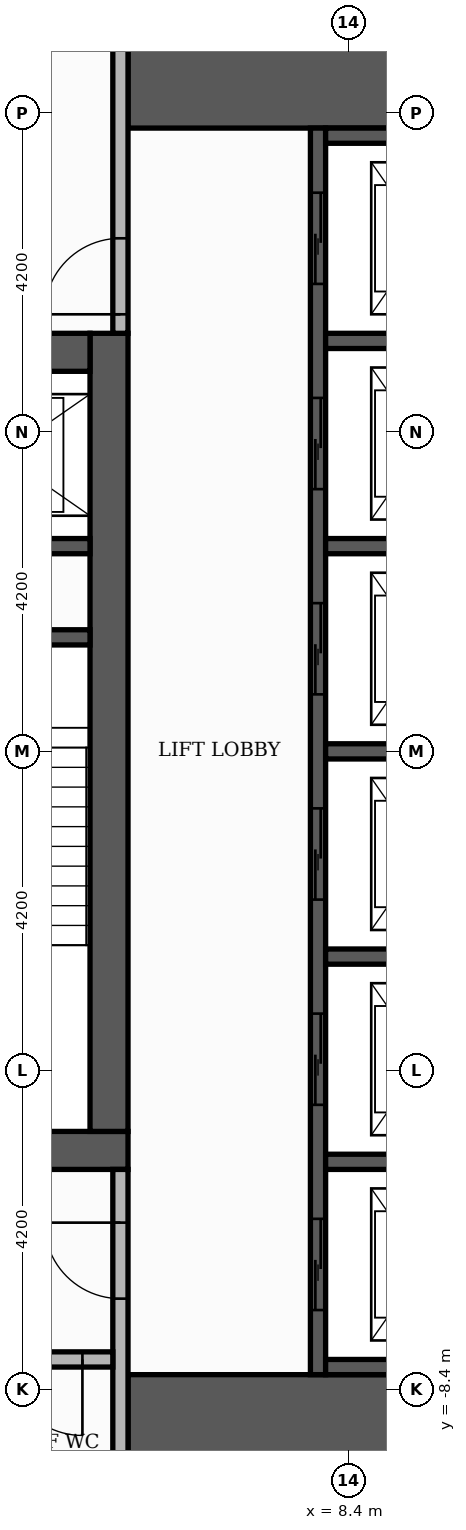
"""IFC4 building model, lengths in metres.
Left out: names, types, materials, properties, quantities, classifications, styles, units other than length and angle.
Written with IfcOpenShell. Run it as: python <this file> out.ifc"""

import sys

from ifc_helpers import new_model, si_unit, direction, frame, frame_2d, origin, place, context, subcontext, project, spatial, rectangle, extrude, element, fill, save


model = new_model("IFC4")
c1 = context("Model", 3, precision=1e-05, world=origin(), true_north=direction((0.0, 1.0)))
c2 = subcontext(c1, "Body", "Model", "MODEL_VIEW")
j1 = project(units=[si_unit("LENGTHUNIT", "METRE"), si_unit("PLANEANGLEUNIT", "RADIAN")], contexts=[c1])
p1 = place(None, origin())
s1 = spatial("IfcSite", under=j1, at=p1, CompositionType="ELEMENT")
p2 = place(p1, origin())
s2 = spatial("IfcBuilding", under=s1, at=p2, CompositionType="ELEMENT")
p3 = place(p2, frame((0.0, 0.0, 223.5)))
s3 = spatial("IfcBuildingStorey", under=s2, at=p3, CompositionType="ELEMENT", Elevation=223.5)
p4 = place(p3, frame((-5.5, -5.25, 0.0), z_axis=(0.0, 0.0, 1.0), x_axis=(1.0, 0.0, 0.0)))
e1 = element("IfcWall", 1, at=p4, inside=s3, PredefinedType="SHEAR", context=c2, shape_type="SweptSolid", body=[
    extrude(rectangle(XDim=11.0, YDim=0.5, at=frame_2d((5.5, 0.0))), origin(), (0.0, 0.0, 1.0), 3.48),
])
p5 = place(p4, frame((4.9, 0.0, 0.0)))
e2 = element("IfcOpeningElement", 2, at=p5, cuts=e1, PredefinedType="OPENING", context=c2, shape_type="SweptSolid", body=[
    extrude(rectangle(XDim=1.2, YDim=2.1, at=frame_2d((0.6, 1.05))), frame((0.0, 0.26, 0.0), z_axis=(0.0, -1.0, 0.0), x_axis=(1.0, 0.0, 0.0)), (0.0, 0.0, 1.0), 0.52),
])
p6 = place(p3, frame((5.25, -5.0, 0.0), z_axis=(0.0, 0.0, 1.0), x_axis=(0.0, 1.0, 0.0)))
e3 = element("IfcWall", 3, at=p6, inside=s3, PredefinedType="SHEAR", context=c2, shape_type="SweptSolid", body=[
    extrude(rectangle(XDim=10.5, YDim=0.5, at=frame_2d((5.25, 0.0))), origin(), (0.0, 0.0, 1.0), 3.48),
])
p7 = place(p3, frame((-5.0, 5.25, 0.0), z_axis=(0.0, 0.0, 1.0), x_axis=(1.0, 0.0, 0.0)))
e4 = element("IfcWall", 4, at=p7, inside=s3, PredefinedType="SHEAR", context=c2, shape_type="SweptSolid", body=[
    extrude(rectangle(XDim=10.0, YDim=0.5, at=frame_2d((5.0, 0.0))), origin(), (0.0, 0.0, 1.0), 3.48),
])
p8 = place(p7, frame((4.4, 0.0, 0.0)))
e5 = element("IfcOpeningElement", 5, at=p8, cuts=e4, PredefinedType="OPENING", context=c2, shape_type="SweptSolid", body=[
    extrude(rectangle(XDim=1.2, YDim=2.1, at=frame_2d((0.6, 1.05))), frame((0.0, 0.26, 0.0), z_axis=(0.0, -1.0, 0.0), x_axis=(1.0, 0.0, 0.0)), (0.0, 0.0, 1.0), 0.52),
])
for number, where, z_axis, x_axis in (
    (6, (5.5, -9.15, 0.0), (0.0, 0.0, 1.0), (1.0, 0.0, 0.0)),
    (7, (5.5, 9.15, 0.0), (0.0, 0.0, 1.0), (1.0, 0.0, 0.0)),
):
    element("IfcWall", number, at=place(p3, frame(where, z_axis=z_axis, x_axis=x_axis)), inside=s3, PredefinedType="SHEAR", context=c2, shape_type="SweptSolid", body=[
        extrude(rectangle(XDim=4.6, YDim=1.9, at=frame_2d((2.3, 0.0))), origin(), (0.0, 0.0, 1.0), 3.48),
    ])
p9 = place(p3, frame((2.15, 1.5, 0.0), z_axis=(0.0, 0.0, 1.0), x_axis=(1.0, 0.0, 0.0)))
e8 = element("IfcWall", 8, at=p9, inside=s3, PredefinedType="SHEAR", context=c2, shape_type="SweptSolid", body=[
    extrude(rectangle(XDim=2.85, YDim=0.2, at=frame_2d((1.425, 0.0))), origin(), (0.0, 0.0, 1.0), 3.48),
])
p10 = place(p3, frame((8.0, -8.2, 0.0), z_axis=(0.0, 0.0, 1.0), x_axis=(0.0, 1.0, 0.0)))
e9 = element("IfcWall", 9, at=p10, inside=s3, PredefinedType="SHEAR", context=c2, shape_type="SweptSolid", body=[
    extrude(rectangle(XDim=16.4, YDim=0.2, at=frame_2d((8.2, 0.0))), origin(), (0.0, 0.0, 1.0), 3.48),
])
p11 = place(p10, frame((0.85, 0.0, 0.0)))
e10 = element("IfcOpeningElement", 10, at=p11, cuts=e9, PredefinedType="OPENING", context=c2, shape_type="SweptSolid", body=[
    extrude(rectangle(XDim=1.2, YDim=2.1, at=frame_2d((0.6, 1.05))), frame((0.0, 0.11, 0.0), z_axis=(0.0, -1.0, 0.0), x_axis=(1.0, 0.0, 0.0)), (0.0, 0.0, 1.0), 0.22),
])
p12 = place(p10, frame((3.55, 0.0, 0.0)))
e11 = element("IfcOpeningElement", 11, at=p12, cuts=e9, PredefinedType="OPENING", context=c2, shape_type="SweptSolid", body=[
    extrude(rectangle(XDim=1.2, YDim=2.1, at=frame_2d((0.6, 1.05))), frame((0.0, 0.11, 0.0), z_axis=(0.0, -1.0, 0.0), x_axis=(1.0, 0.0, 0.0)), (0.0, 0.0, 1.0), 0.22),
])
p13 = place(p10, frame((6.25, 0.0, 0.0)))
e12 = element("IfcOpeningElement", 12, at=p13, cuts=e9, PredefinedType="OPENING", context=c2, shape_type="SweptSolid", body=[
    extrude(rectangle(XDim=1.2, YDim=2.1, at=frame_2d((0.6, 1.05))), frame((0.0, 0.11, 0.0), z_axis=(0.0, -1.0, 0.0), x_axis=(1.0, 0.0, 0.0)), (0.0, 0.0, 1.0), 0.22),
])
p14 = place(p10, frame((8.95, 0.0, 0.0)))
e13 = element("IfcOpeningElement", 13, at=p14, cuts=e9, PredefinedType="OPENING", context=c2, shape_type="SweptSolid", body=[
    extrude(rectangle(XDim=1.2, YDim=2.1, at=frame_2d((0.6, 1.05))), frame((0.0, 0.11, 0.0), z_axis=(0.0, -1.0, 0.0), x_axis=(1.0, 0.0, 0.0)), (0.0, 0.0, 1.0), 0.22),
])
p15 = place(p10, frame((11.65, 0.0, 0.0)))
e14 = element("IfcOpeningElement", 14, at=p15, cuts=e9, PredefinedType="OPENING", context=c2, shape_type="SweptSolid", body=[
    extrude(rectangle(XDim=1.2, YDim=2.1, at=frame_2d((0.6, 1.05))), frame((0.0, 0.11, 0.0), z_axis=(0.0, -1.0, 0.0), x_axis=(1.0, 0.0, 0.0)), (0.0, 0.0, 1.0), 0.22),
])
p16 = place(p10, frame((14.35, 0.0, 0.0)))
e15 = element("IfcOpeningElement", 15, at=p16, cuts=e9, PredefinedType="OPENING", context=c2, shape_type="SweptSolid", body=[
    extrude(rectangle(XDim=1.2, YDim=2.1, at=frame_2d((0.6, 1.05))), frame((0.0, 0.11, 0.0), z_axis=(0.0, -1.0, 0.0), x_axis=(1.0, 0.0, 0.0)), (0.0, 0.0, 1.0), 0.22),
])
for number, where, z_axis, x_axis in (
    (16, (8.1, -8.1, 0.0), (0.0, 0.0, 1.0), (1.0, 0.0, 0.0)),
    (17, (8.1, -5.4, 0.0), (0.0, 0.0, 1.0), (1.0, 0.0, 0.0)),
    (18, (8.1, -2.7, 0.0), (0.0, 0.0, 1.0), (1.0, 0.0, 0.0)),
    (19, (8.1, 0.0, 0.0), (0.0, 0.0, 1.0), (1.0, 0.0, 0.0)),
):
    element("IfcWall", number, at=place(p3, frame(where, z_axis=z_axis, x_axis=x_axis)), inside=s3, PredefinedType="SHEAR", context=c2, shape_type="SweptSolid", body=[
        extrude(rectangle(XDim=2.0, YDim=0.2, at=frame_2d((1.0, 0.0))), origin(), (0.0, 0.0, 1.0), 3.48),
    ])
p17 = place(p3, frame((2.15, 2.7, 0.0), z_axis=(0.0, 0.0, 1.0), x_axis=(1.0, 0.0, 0.0)))
e20 = element("IfcWall", 20, at=p17, inside=s3, PredefinedType="SHEAR", context=c2, shape_type="SweptSolid", body=[
    extrude(rectangle(XDim=2.85, YDim=0.2, at=frame_2d((1.425, 0.0))), origin(), (0.0, 0.0, 1.0), 3.48),
])
for number, where, z_axis, x_axis in (
    (21, (8.1, 2.7, 0.0), (0.0, 0.0, 1.0), (1.0, 0.0, 0.0)),
    (22, (8.1, 5.4, 0.0), (0.0, 0.0, 1.0), (1.0, 0.0, 0.0)),
    (23, (8.1, 8.1, 0.0), (0.0, 0.0, 1.0), (1.0, 0.0, 0.0)),
):
    element("IfcWall", number, at=place(p3, frame(where, z_axis=z_axis, x_axis=x_axis)), inside=s3, PredefinedType="SHEAR", context=c2, shape_type="SweptSolid", body=[
        extrude(rectangle(XDim=2.0, YDim=0.2, at=frame_2d((1.0, 0.0))), origin(), (0.0, 0.0, 1.0), 3.48),
    ])
p18 = place(p3, frame((5.4, -10.1, 0.0), z_axis=(0.0, 0.0, 1.0), x_axis=(0.0, 1.0, 0.0)))
e24 = element("IfcWall", 24, at=p18, inside=s3, PredefinedType="PARTITIONING", context=c2, shape_type="SweptSolid", body=[
    extrude(rectangle(XDim=4.6, YDim=0.2, at=frame_2d((2.3, 0.0))), origin(), (0.0, 0.0, 1.0), 3.48),
])
p19 = place(p18, frame((2.9, 0.0, 0.0)))
e25 = element("IfcOpeningElement", 25, at=p19, cuts=e24, PredefinedType="OPENING", context=c2, shape_type="SweptSolid", body=[
    extrude(rectangle(XDim=1.0, YDim=2.1, at=frame_2d((0.5, 1.05))), frame((0.0, 0.11, 0.0), z_axis=(0.0, -1.0, 0.0), x_axis=(1.0, 0.0, 0.0)), (0.0, 0.0, 1.0), 0.22),
])
p20 = place(p3, frame((3.55, -8.0, 0.0), z_axis=(0.0, 0.0, 1.0), x_axis=(1.0, 0.0, 0.0)))
e26 = element("IfcWall", 26, at=p20, inside=s3, PredefinedType="PARTITIONING", context=c2, shape_type="SweptSolid", body=[
    extrude(rectangle(XDim=1.75, YDim=0.2, at=frame_2d((0.875, 0.0))), origin(), (0.0, 0.0, 1.0), 3.48),
])
p21 = place(p20, frame((0.35, 0.0, 0.0)))
e27 = element("IfcOpeningElement", 27, at=p21, cuts=e26, PredefinedType="OPENING", context=c2, shape_type="SweptSolid", body=[
    extrude(rectangle(XDim=1.0, YDim=2.1, at=frame_2d((0.5, 1.05))), frame((0.0, 0.11, 0.0), z_axis=(0.0, -1.0, 0.0), x_axis=(1.0, 0.0, 0.0)), (0.0, 0.0, 1.0), 0.22),
])
p22 = place(p3, frame((5.4, 5.5, 0.0), z_axis=(0.0, 0.0, 1.0), x_axis=(0.0, 1.0, 0.0)))
e28 = element("IfcWall", 28, at=p22, inside=s3, PredefinedType="PARTITIONING", context=c2, shape_type="SweptSolid", body=[
    extrude(rectangle(XDim=4.6, YDim=0.2, at=frame_2d((2.3, 0.0))), origin(), (0.0, 0.0, 1.0), 3.48),
])
p23 = place(p22, frame((0.25, 0.0, 0.0)))
e29 = element("IfcOpeningElement", 29, at=p23, cuts=e28, PredefinedType="OPENING", context=c2, shape_type="SweptSolid", body=[
    extrude(rectangle(XDim=1.0, YDim=2.1, at=frame_2d((0.5, 1.05))), frame((0.0, 0.11, 0.0), z_axis=(0.0, -1.0, 0.0), x_axis=(1.0, 0.0, 0.0)), (0.0, 0.0, 1.0), 0.22),
])
p24 = place(p11, origin())
e30 = element("IfcDoor", 30, at=p24, inside=s3, OperationType="SLIDING_TO_LEFT", PredefinedType="DOOR", context=c2, shape_type="SweptSolid", body=[
    extrude(rectangle(XDim=1.2, YDim=2.1, at=frame_2d((0.6, 1.05))), frame((0.0, 0.025, 0.0), z_axis=(0.0, -1.0, 0.0), x_axis=(1.0, 0.0, 0.0)), (0.0, 0.0, 1.0), 0.05),
])
fill(e10, e30)
p25 = place(p12, origin())
e31 = element("IfcDoor", 31, at=p25, inside=s3, OperationType="SLIDING_TO_LEFT", PredefinedType="DOOR", context=c2, shape_type="SweptSolid", body=[
    extrude(rectangle(XDim=1.2, YDim=2.1, at=frame_2d((0.6, 1.05))), frame((0.0, 0.025, 0.0), z_axis=(0.0, -1.0, 0.0), x_axis=(1.0, 0.0, 0.0)), (0.0, 0.0, 1.0), 0.05),
])
fill(e11, e31)
p26 = place(p13, origin())
e32 = element("IfcDoor", 32, at=p26, inside=s3, OperationType="SLIDING_TO_LEFT", PredefinedType="DOOR", context=c2, shape_type="SweptSolid", body=[
    extrude(rectangle(XDim=1.2, YDim=2.1, at=frame_2d((0.6, 1.05))), frame((0.0, 0.025, 0.0), z_axis=(0.0, -1.0, 0.0), x_axis=(1.0, 0.0, 0.0)), (0.0, 0.0, 1.0), 0.05),
])
fill(e12, e32)
p27 = place(p14, origin())
e33 = element("IfcDoor", 33, at=p27, inside=s3, OperationType="SLIDING_TO_LEFT", PredefinedType="DOOR", context=c2, shape_type="SweptSolid", body=[
    extrude(rectangle(XDim=1.2, YDim=2.1, at=frame_2d((0.6, 1.05))), frame((0.0, 0.025, 0.0), z_axis=(0.0, -1.0, 0.0), x_axis=(1.0, 0.0, 0.0)), (0.0, 0.0, 1.0), 0.05),
])
fill(e13, e33)
p28 = place(p15, origin())
e34 = element("IfcDoor", 34, at=p28, inside=s3, OperationType="SLIDING_TO_LEFT", PredefinedType="DOOR", context=c2, shape_type="SweptSolid", body=[
    extrude(rectangle(XDim=1.2, YDim=2.1, at=frame_2d((0.6, 1.05))), frame((0.0, 0.025, 0.0), z_axis=(0.0, -1.0, 0.0), x_axis=(1.0, 0.0, 0.0)), (0.0, 0.0, 1.0), 0.05),
])
fill(e14, e34)
p29 = place(p16, origin())
e35 = element("IfcDoor", 35, at=p29, inside=s3, OperationType="SLIDING_TO_LEFT", PredefinedType="DOOR", context=c2, shape_type="SweptSolid", body=[
    extrude(rectangle(XDim=1.2, YDim=2.1, at=frame_2d((0.6, 1.05))), frame((0.0, 0.025, 0.0), z_axis=(0.0, -1.0, 0.0), x_axis=(1.0, 0.0, 0.0)), (0.0, 0.0, 1.0), 0.05),
])
fill(e15, e35)
p30 = place(p23, origin())
e36 = element("IfcDoor", 36, at=p30, inside=s3, OperationType="SINGLE_SWING_LEFT", PredefinedType="DOOR", context=c2, shape_type="SweptSolid", body=[
    extrude(rectangle(XDim=1.0, YDim=2.1, at=frame_2d((0.5, 1.05))), frame((0.0, 0.025, 0.0), z_axis=(0.0, -1.0, 0.0), x_axis=(1.0, 0.0, 0.0)), (0.0, 0.0, 1.0), 0.05),
])
fill(e29, e36)
p31 = place(p19, origin())
e37 = element("IfcDoor", 37, at=p31, inside=s3, OperationType="SINGLE_SWING_RIGHT", PredefinedType="DOOR", context=c2, shape_type="SweptSolid", body=[
    extrude(rectangle(XDim=1.0, YDim=2.1, at=frame_2d((0.5, 1.05))), frame((0.0, 0.025, 0.0), z_axis=(0.0, -1.0, 0.0), x_axis=(1.0, 0.0, 0.0)), (0.0, 0.0, 1.0), 0.05),
])
fill(e25, e37)
p32 = place(p21, frame((1.0, 0.0, 0.0), z_axis=(0.0, 0.0, 1.0), x_axis=(-1.0, 0.0, 0.0)))
e38 = element("IfcDoor", 38, at=p32, inside=s3, OperationType="SINGLE_SWING_RIGHT", PredefinedType="DOOR", context=c2, shape_type="SweptSolid", body=[
    extrude(rectangle(XDim=1.0, YDim=2.1, at=frame_2d((0.5, 1.05))), frame((0.0, 0.025, 0.0), z_axis=(0.0, -1.0, 0.0), x_axis=(1.0, 0.0, 0.0)), (0.0, 0.0, 1.0), 0.05),
])
fill(e27, e38)
save(model, sys.argv[1])
